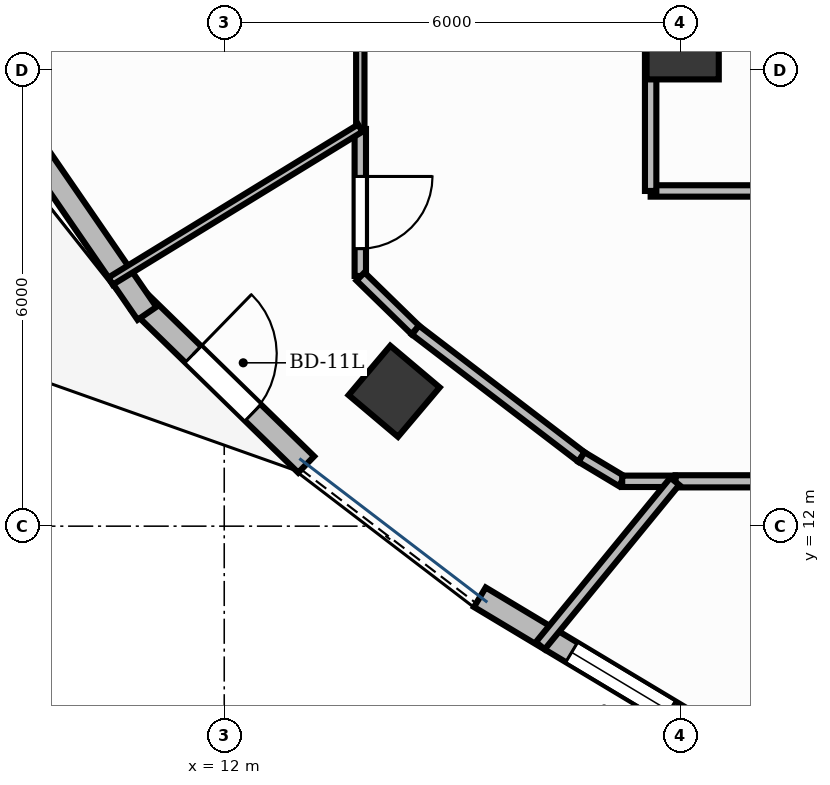
"""IFC4 building model, lengths in metres.
Left out: names, types, materials, properties, quantities, classifications, styles, units other than length and angle.
Written with IfcOpenShell. Run it as: python <this file> out.ifc"""

import sys

from ifc_helpers import new_model, si_unit, direction, frame, frame_2d, origin, origin_2d, place, context, subcontext, project, spatial, rectangle, extrude, element, fill, save


model = new_model("IFC4")
c1 = context("Model", 3, precision=1e-05, world=origin(), true_north=direction((0.0, 1.0)))
c2 = subcontext(c1, "Body", "Model", "MODEL_VIEW")
j1 = project(units=[si_unit("LENGTHUNIT", "METRE"), si_unit("PLANEANGLEUNIT", "RADIAN")], contexts=[c1])
p1 = place(None, origin())
s1 = spatial("IfcSite", under=j1, at=p1, CompositionType="ELEMENT")
p2 = place(p1, origin())
s2 = spatial("IfcBuilding", under=s1, at=p2, CompositionType="ELEMENT")
p3 = place(p2, frame((0.0, 0.0, 252.0)))
s3 = spatial("IfcBuildingStorey", under=s2, at=p3, CompositionType="ELEMENT", Elevation=252.0)
p4 = place(p3, frame((18.031, 18.353, -0.0), z_axis=(0.0, 0.0, 1.0), x_axis=(1.0, 0.0, 0.0)))
e1 = element("IfcColumn", 1, at=p4, inside=s3, PredefinedType="COLUMN", context=c2, shape_type="SweptSolid", body=[
    extrude(rectangle(XDim=0.95, YDim=0.95, at=origin_2d()), origin(), (0.0, 0.0, 1.0), 3.901),
])
p5 = place(p3, frame((14.235, 13.775, -0.0), z_axis=(0.0, 0.0, 1.0), x_axis=(-0.764246456939, 0.644924300253, 0.0)))
e2 = element("IfcColumn", 2, at=p5, inside=s3, PredefinedType="COLUMN", context=c2, shape_type="SweptSolid", body=[
    extrude(rectangle(XDim=0.85, YDim=0.85, at=origin_2d()), origin(), (0.0, 0.0, 1.0), 3.901),
])
p6 = place(p3, frame((10.892, 14.943, 0.0), z_axis=(0.0, 0.0, 1.0), x_axis=(0.716005135245, -0.698095012375, 0.0)))
e3 = element("IfcWall", 3, at=p6, inside=s3, PredefinedType="STANDARD", context=c2, shape_type="SweptSolid", body=[
    extrude(rectangle(XDim=3.053, YDim=0.3, at=frame_2d((1.527, 0.0))), origin(), (0.0, 0.0, 1.0), 3.9),
])
p7 = place(p6, frame((0.977, 0.0, 0.0)))
e4 = element("IfcOpeningElement", 4, at=p7, cuts=e3, PredefinedType="OPENING", context=c2, shape_type="SweptSolid", body=[
    extrude(rectangle(XDim=1.1, YDim=2.15, at=frame_2d((0.55, 1.075))), frame((0.0, 0.165, 0.0), z_axis=(0.0, -1.0, 0.0), x_axis=(1.0, 0.0, 0.0)), (0.0, 0.0, 1.0), 0.33),
])
p8 = place(p3, frame((15.363, 11.065, 0.0), z_axis=(0.0, 0.0, 1.0), x_axis=(0.857526080841, -0.514440492844, 0.0)))
e5 = element("IfcWall", 5, at=p8, inside=s3, PredefinedType="STANDARD", context=c2, shape_type="SweptSolid", body=[
    extrude(rectangle(XDim=3.249, YDim=0.3, at=frame_2d((1.624, 0.0))), origin(), (0.0, 0.0, 1.0), 3.9),
])
p9 = place(p8, frame((1.408, 0.0, 0.95)))
e6 = element("IfcOpeningElement", 6, at=p9, cuts=e5, PredefinedType="OPENING", context=c2, shape_type="SweptSolid", body=[
    extrude(rectangle(XDim=1.5, YDim=1.8, at=frame_2d((0.75, 0.9))), frame((0.0, 0.165, 0.0), z_axis=(0.0, -1.0, 0.0), x_axis=(1.0, 0.0, 0.0)), (0.0, 0.0, 1.0), 0.33),
])
p10 = place(p3, frame((7.735, 19.524, 0.0), z_axis=(0.0, 0.0, 1.0), x_axis=(0.566669772846, -0.823945003349, 0.0)))
e7 = element("IfcWall", 7, at=p10, inside=s3, PredefinedType="STANDARD", context=c2, shape_type="SweptSolid", body=[
    extrude(rectangle(XDim=5.734, YDim=0.3, at=frame_2d((2.867, 0.0))), origin(), (0.0, 0.0, 1.0), 3.9),
])
p11 = place(p3, frame((13.79, 21.79, 0.0), z_axis=(0.0, 0.0, 1.0), x_axis=(0.0, -1.0, 0.0)))
e8 = element("IfcWall", 8, at=p11, inside=s3, PredefinedType="MOVABLE", context=c2, shape_type="SweptSolid", body=[
    extrude(rectangle(XDim=4.553, YDim=0.11, at=frame_2d((2.276, 0.0))), origin(), (0.0, 0.0, 1.0), 2.91),
])
p12 = place(p11, frame((0.372, 0.0, 0.0)))
e9 = element("IfcOpeningElement", 9, at=p12, cuts=e8, PredefinedType="OPENING", context=c2, shape_type="SweptSolid", body=[
    extrude(rectangle(XDim=0.95, YDim=2.15, at=frame_2d((0.475, 1.075))), frame((0.0, 0.07, 0.0), z_axis=(0.0, -1.0, 0.0), x_axis=(1.0, 0.0, 0.0)), (0.0, 0.0, 1.0), 0.14),
])
p13 = place(p3, frame((13.79, 17.226, 0.0), z_axis=(0.0, 0.0, 1.0), x_axis=(0.0, -1.0, 0.0)))
e10 = element("IfcWall", 10, at=p13, inside=s3, PredefinedType="PARTITIONING", context=c2, shape_type="SweptSolid", body=[
    extrude(rectangle(XDim=1.934, YDim=0.15, at=frame_2d((0.967, 0.0))), origin(), (0.0, 0.0, 1.0), 2.91),
])
p14 = place(p13, frame((0.625, 0.0, 0.0)))
e11 = element("IfcOpeningElement", 11, at=p14, cuts=e10, PredefinedType="OPENING", context=c2, shape_type="SweptSolid", body=[
    extrude(rectangle(XDim=0.95, YDim=2.15, at=frame_2d((0.475, 1.075))), frame((0.0, 0.09, 0.0), z_axis=(0.0, -1.0, 0.0), x_axis=(1.0, 0.0, 0.0)), (0.0, 0.0, 1.0), 0.18),
])
p15 = place(p3, frame((17.938, 12.59, 0.0), z_axis=(0.0, 0.0, 1.0), x_axis=(1.0, 0.0, 0.0)))
e12 = element("IfcWall", 12, at=p15, inside=s3, PredefinedType="PARTITIONING", context=c2, shape_type="SweptSolid", body=[
    extrude(rectangle(XDim=8.246, YDim=0.16, at=frame_2d((4.123, 0.0))), origin(), (0.0, 0.0, 1.0), 2.91),
])
p16 = place(p15, frame((5.364, 0.0, 0.0)))
e13 = element("IfcOpeningElement", 13, at=p16, cuts=e12, PredefinedType="OPENING", context=c2, shape_type="SweptSolid", body=[
    extrude(rectangle(XDim=0.95, YDim=2.15, at=frame_2d((0.475, 1.075))), frame((0.0, 0.095, 0.0), z_axis=(0.0, -1.0, 0.0), x_axis=(1.0, 0.0, 0.0)), (0.0, 0.0, 1.0), 0.19),
])
p17 = place(p3, frame((13.79, 17.237, 0.0), z_axis=(0.0, 0.0, 1.0), x_axis=(-0.852642224979, -0.522495202066, 0.0)))
e14 = element("IfcWall", 14, at=p17, inside=s3, PredefinedType="MOVABLE", context=c2, shape_type="SweptSolid", body=[
    extrude(rectangle(XDim=3.854, YDim=0.11, at=frame_2d((1.927, 0.0))), origin(), (0.0, 0.0, 1.0), 2.91),
])
p18 = place(p3, frame((21.055, 16.41, 0.0), z_axis=(0.0, 0.0, 1.0), x_axis=(-1.0, 0.0, 0.0)))
e15 = element("IfcWall", 15, at=p18, inside=s3, PredefinedType="PARTITIONING", context=c2, shape_type="SweptSolid", body=[
    extrude(rectangle(XDim=3.445, YDim=0.15, at=frame_2d((1.722, 0.0))), origin(), (0.0, 0.0, 1.0), 2.91),
])
p19 = place(p3, frame((17.61, 16.41, 0.0), z_axis=(0.0, 0.0, 1.0), x_axis=(0.0, 1.0, 0.0)))
e16 = element("IfcWall", 16, at=p19, inside=s3, PredefinedType="PARTITIONING", context=c2, shape_type="SweptSolid", body=[
    extrude(rectangle(XDim=5.888, YDim=0.15, at=frame_2d((2.944, 0.0))), origin(), (0.0, 0.0, 1.0), 2.91),
])
p20 = place(p3, frame((13.793, 15.284, 0.0), z_axis=(0.0, 0.0, 1.0), x_axis=(0.7160122468, -0.698087718294, 0.0)))
e17 = element("IfcWall", 17, at=p20, inside=s3, PredefinedType="PARTITIONING", context=c2, shape_type="SweptSolid", body=[
    extrude(rectangle(XDim=1.008, YDim=0.15, at=frame_2d((0.504, 0.0))), origin(), (0.0, 0.0, 1.0), 2.91),
])
p21 = place(p3, frame((14.516, 14.58, 0.0), z_axis=(0.0, 0.0, 1.0), x_axis=(0.794390609039, -0.60740724417, 0.0)))
e18 = element("IfcWall", 18, at=p21, inside=s3, PredefinedType="PARTITIONING", context=c2, shape_type="SweptSolid", body=[
    extrude(rectangle(XDim=2.749, YDim=0.15, at=frame_2d((1.374, 0.0))), origin(), (0.0, 0.0, 1.0), 2.91),
])
p22 = place(p3, frame((16.7, 12.91, 0.0), z_axis=(0.0, 0.0, 1.0), x_axis=(0.857458106414, -0.514553783141, 0.0)))
e19 = element("IfcWall", 19, at=p22, inside=s3, PredefinedType="PARTITIONING", context=c2, shape_type="SweptSolid", body=[
    extrude(rectangle(XDim=0.619, YDim=0.15, at=frame_2d((0.309, 0.0))), origin(), (0.0, 0.0, 1.0), 2.91),
])
p23 = place(p3, frame((17.236, 12.59, 0.0), z_axis=(0.0, 0.0, 1.0), x_axis=(1.0, 0.0, 0.0)))
e20 = element("IfcWall", 20, at=p23, inside=s3, PredefinedType="PARTITIONING", context=c2, shape_type="SweptSolid", body=[
    extrude(rectangle(XDim=0.692, YDim=0.15, at=frame_2d((0.346, 0.0))), origin(), (0.0, 0.0, 1.0), 2.91),
])
p24 = place(p3, frame((17.928, 12.59, 0.0), z_axis=(0.0, 0.0, 1.0), x_axis=(-0.633318665549, -0.773891121455, 0.0)))
e21 = element("IfcWall", 21, at=p24, inside=s3, PredefinedType="PARTITIONING", context=c2, shape_type="SweptSolid", body=[
    extrude(rectangle(XDim=2.794, YDim=0.15, at=frame_2d((1.397, 0.0))), origin(), (0.0, 0.0, 1.0), 2.91),
])
p25 = place(p7, origin())
e22 = element("IfcDoor", 22, at=p25, inside=s3, OperationType="SINGLE_SWING_LEFT", PredefinedType="DOOR", context=c2, shape_type="SweptSolid", body=[
    extrude(rectangle(XDim=1.1, YDim=2.15, at=frame_2d((0.55, 1.075))), frame((0.0, 0.025, 0.0), z_axis=(0.0, -1.0, 0.0), x_axis=(1.0, 0.0, 0.0)), (0.0, 0.0, 1.0), 0.05),
])
fill(e4, e22)
p26 = place(p9, origin())
e23 = element("IfcWindow", 23, at=p26, inside=s3, PartitioningType="DOUBLE_PANEL_VERTICAL", PredefinedType="WINDOW", context=c2, shape_type="SweptSolid", body=[
    extrude(rectangle(XDim=1.5, YDim=1.8, at=frame_2d((0.75, 0.9))), frame((0.0, 0.03, 0.0), z_axis=(0.0, -1.0, 0.0), x_axis=(1.0, 0.0, 0.0)), (0.0, 0.0, 1.0), 0.06),
])
fill(e6, e23)
p27 = place(p14, origin())
e24 = element("IfcDoor", 24, at=p27, inside=s3, OperationType="SINGLE_SWING_LEFT", PredefinedType="DOOR", context=c2, shape_type="SweptSolid", body=[
    extrude(rectangle(XDim=0.95, YDim=2.15, at=frame_2d((0.475, 1.075))), frame((0.0, 0.025, 0.0), z_axis=(0.0, -1.0, 0.0), x_axis=(1.0, 0.0, 0.0)), (0.0, 0.0, 1.0), 0.05),
])
fill(e11, e24)
save(model, sys.argv[1])
